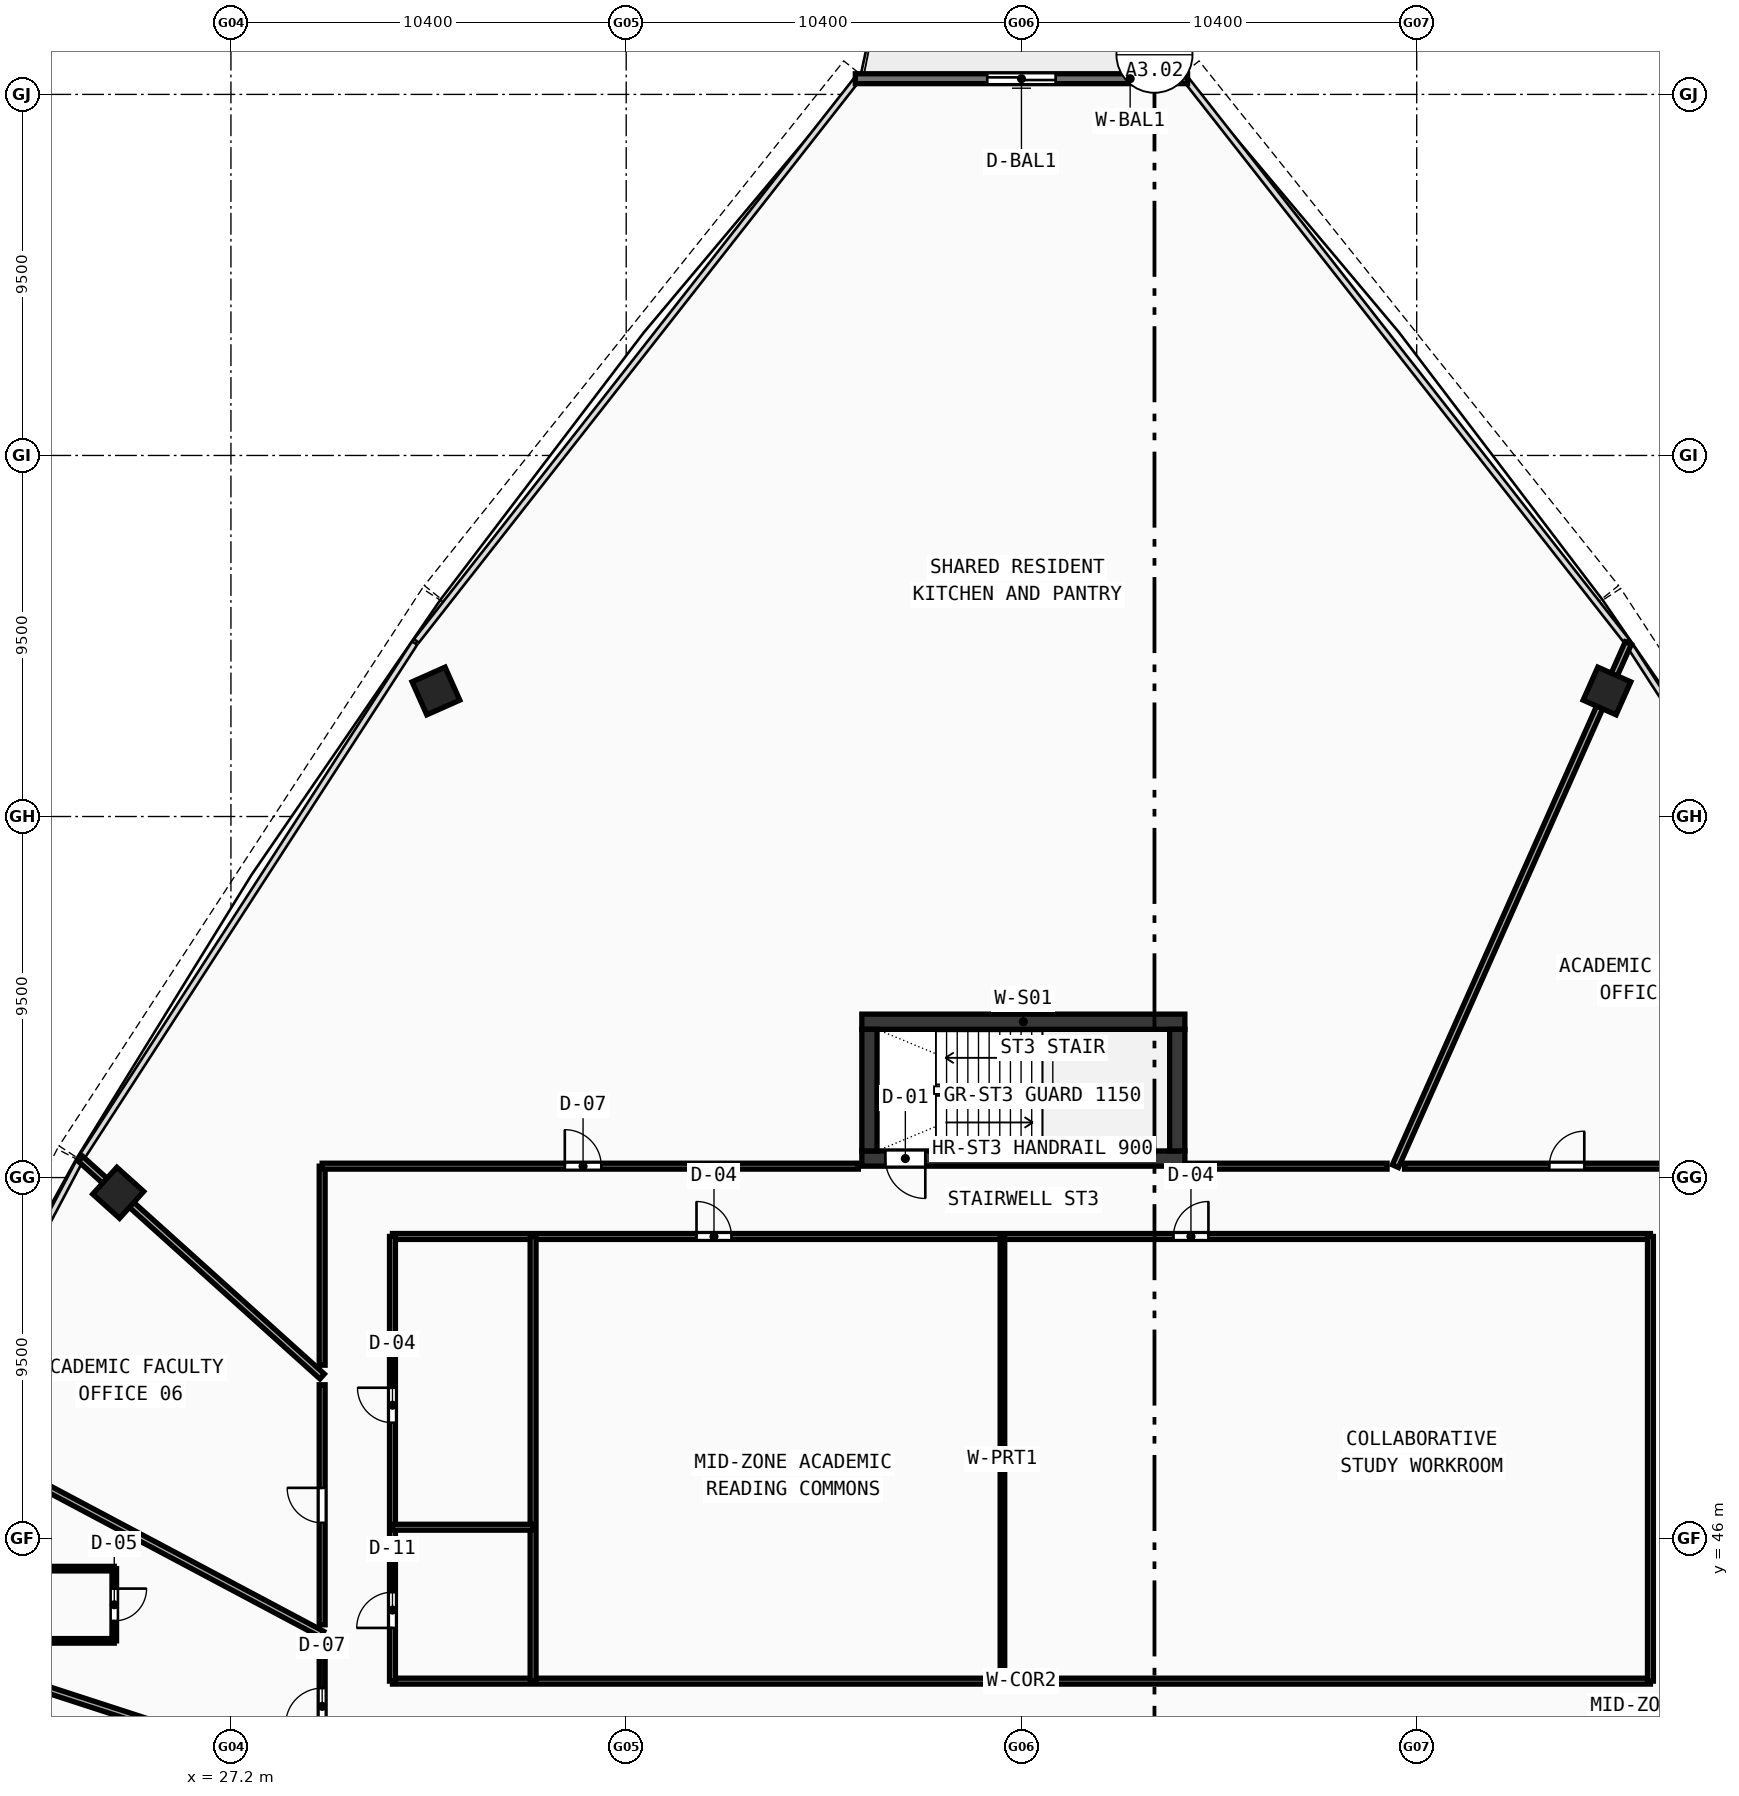
"""IFC4 building model, lengths in metres.
Left out: names, types, materials, properties, quantities, classifications, styles, units other than length and angle.
Written with IfcOpenShell. Run it as: python <this file> out.ifc"""

import sys

from ifc_helpers import new_model, si_unit, direction, frame, frame_2d, origin, origin_with_axes, origin_2d, place, context, subcontext, project, spatial, rectangle, hollow_rectangle, extrude, source, transform, mapped, element, fill, save


model = new_model("IFC4")
c1 = context("Model", 3, precision=1e-05, world=origin(), true_north=direction((0.0, 1.0)))
c2 = subcontext(c1, "Body", "Model", "MODEL_VIEW")
j1 = project(units=[si_unit("LENGTHUNIT", "METRE"), si_unit("PLANEANGLEUNIT", "RADIAN")], contexts=[c1])
p1 = place(None, origin())
s1 = spatial("IfcSite", under=j1, at=p1, CompositionType="ELEMENT")
p2 = place(p1, origin())
s2 = spatial("IfcBuilding", under=s1, at=p2, CompositionType="ELEMENT")
p3 = place(p2, frame((0.0, 0.0, 155.59)))
s3 = spatial("IfcBuildingStorey", under=s2, at=p3, CompositionType="ELEMENT", Elevation=155.59)
p4 = place(p3, frame((43.8, 59.6, 0.0), z_axis=(0.0, 0.0, 1.0), x_axis=(1.0, 0.0, 0.0)))
e1 = element("IfcWall", 1, at=p4, inside=s3, PredefinedType="SHEAR", context=c2, shape_type="SweptSolid", body=[
    extrude(rectangle(XDim=8.5, YDim=0.4, at=frame_2d((4.25, 0.0))), origin(), (0.0, 0.0, 1.0), 3.42),
])
p5 = place(p3, frame((43.8, 56.0, 0.0), z_axis=(0.0, 0.0, 1.0), x_axis=(1.0, 0.0, 0.0)))
e2 = element("IfcWall", 2, at=p5, inside=s3, PredefinedType="SHEAR", context=c2, shape_type="SweptSolid", body=[
    extrude(rectangle(XDim=8.5, YDim=0.4, at=frame_2d((4.25, 0.0))), origin(), (0.0, 0.0, 1.0), 3.42),
])
p6 = place(p5, frame((0.62, 0.0, 0.0)))
e3 = element("IfcOpeningElement", 3, at=p6, cuts=e2, PredefinedType="OPENING", context=c2, shape_type="SweptSolid", body=[
    extrude(rectangle(XDim=1.05, YDim=2.1, at=frame_2d((0.525, 1.05))), frame((0.0, 0.21, 0.0), z_axis=(0.0, -1.0, 0.0), x_axis=(1.0, 0.0, 0.0)), (0.0, 0.0, 1.0), 0.42),
])
for number, where, z_axis, x_axis in (
    (4, (44.0, 56.2, 0.0), (0.0, 0.0, 1.0), (0.0, 1.0, 0.0)),
    (5, (52.1, 56.2, 0.0), (0.0, 0.0, 1.0), (0.0, 1.0, 0.0)),
):
    element("IfcWall", number, at=place(p3, frame(where, z_axis=z_axis, x_axis=x_axis)), inside=s3, PredefinedType="SHEAR", context=c2, shape_type="SweptSolid", body=[
        extrude(rectangle(XDim=3.2, YDim=0.4, at=frame_2d((1.6, 0.0))), origin(), (0.0, 0.0, 1.0), 3.42),
    ])
m1 = source(origin(), c2, "Body", "SweptSolid", [
    extrude(hollow_rectangle(XDim=0.95, YDim=0.95, WallThickness=0.04, at=origin_2d()), origin(), (0.0, 0.0, 1.0), 3.68),
])
for number, where, z_axis, x_axis in (
    (6, (63.406, 68.303, -0.26), (0.0, 0.0, 1.0), (-0.914, 0.407, 0.0)),
    (7, (32.594, 68.303, -0.26), (0.0, 0.0, 1.0), (-0.914, -0.407, 0.0)),
    (8, (24.234, 55.099, -0.26), (0.0, 0.0, 1.0), (-0.669, -0.743, 0.0)),
):
    element("IfcColumn", number, at=place(p3, frame(where, z_axis=z_axis, x_axis=x_axis)), inside=s3, PredefinedType="COLUMN", context=c2, shape_type="MappedRepresentation", body=[
        mapped(m1, transform((0.0, 0.0, 0.0), scale=1.0)),
    ])
p7 = place(p3, frame((52.371, 84.413, 0.0), z_axis=(0.0, 0.0, 1.0), x_axis=(-1.0, 0.0, 0.0)))
e9 = element("IfcWall", 9, at=p7, inside=s3, PredefinedType="STANDARD", context=c2, shape_type="SweptSolid", body=[
    extrude(rectangle(XDim=8.742, YDim=0.26, at=frame_2d((4.371, 0.0))), origin(), (0.0, 0.0, 1.0), 3.42),
])
p8 = place(p7, frame((3.471, 0.0, 0.0)))
e10 = element("IfcOpeningElement", 10, at=p8, cuts=e9, PredefinedType="OPENING", context=c2, shape_type="SweptSolid", body=[
    extrude(rectangle(XDim=1.8, YDim=2.15, at=frame_2d((0.9, 1.075))), frame((0.0, 0.14, 0.0), z_axis=(0.0, -1.0, 0.0), x_axis=(1.0, 0.0, 0.0)), (0.0, 0.0, 1.0), 0.28),
])
p9 = place(p3, frame((31.45, 42.25, 0.0), z_axis=(0.0, 0.0, 1.0), x_axis=(1.0, 0.0, 0.0)))
e11 = element("IfcWall", 11, at=p9, inside=s3, PredefinedType="PARTITIONING", context=c2, shape_type="SweptSolid", body=[
    extrude(rectangle(XDim=33.1, YDim=0.155, at=frame_2d((16.55, 0.0))), origin(), (0.0, 0.0, 1.0), 2.77),
])
p10 = place(p3, frame((31.45, 53.95, 0.0), z_axis=(0.0, 0.0, 1.0), x_axis=(1.0, 0.0, 0.0)))
e12 = element("IfcWall", 12, at=p10, inside=s3, PredefinedType="PARTITIONING", context=c2, shape_type="SweptSolid", body=[
    extrude(rectangle(XDim=33.1, YDim=0.155, at=frame_2d((16.55, 0.0))), origin(), (0.0, 0.0, 1.0), 2.77),
])
p11 = place(p10, frame((8.0, 0.0, 0.0)))
e13 = element("IfcOpeningElement", 13, at=p11, cuts=e12, PredefinedType="OPENING", context=c2, shape_type="SweptSolid", body=[
    extrude(rectangle(XDim=0.92, YDim=2.1, at=frame_2d((0.46, 1.05))), frame((0.0, 0.087, 0.0), z_axis=(0.0, -1.0, 0.0), x_axis=(1.0, 0.0, 0.0)), (0.0, 0.0, 1.0), 0.175),
])
p12 = place(p10, frame((20.55, 0.0, 0.0)))
e14 = element("IfcOpeningElement", 14, at=p12, cuts=e12, PredefinedType="OPENING", context=c2, shape_type="SweptSolid", body=[
    extrude(rectangle(XDim=0.92, YDim=2.1, at=frame_2d((0.46, 1.05))), frame((0.0, 0.087, 0.0), z_axis=(0.0, -1.0, 0.0), x_axis=(1.0, 0.0, 0.0)), (0.0, 0.0, 1.0), 0.175),
])
p13 = place(p3, frame((31.45, 42.25, 0.0), z_axis=(0.0, 0.0, 1.0), x_axis=(0.0, 1.0, 0.0)))
e15 = element("IfcWall", 15, at=p13, inside=s3, PredefinedType="PARTITIONING", context=c2, shape_type="SweptSolid", body=[
    extrude(rectangle(XDim=11.7, YDim=0.155, at=frame_2d((5.85, 0.0))), origin(), (0.0, 0.0, 1.0), 2.77),
])
p14 = place(p13, frame((1.4, 0.0, 0.0)))
e16 = element("IfcOpeningElement", 16, at=p14, cuts=e15, PredefinedType="OPENING", context=c2, shape_type="SweptSolid", body=[
    extrude(rectangle(XDim=0.94, YDim=2.1, at=frame_2d((0.47, 1.05))), frame((0.0, 0.087, 0.0), z_axis=(0.0, -1.0, 0.0), x_axis=(1.0, 0.0, 0.0)), (0.0, 0.0, 1.0), 0.175),
])
p15 = place(p13, frame((6.8, 0.0, 0.0)))
e17 = element("IfcOpeningElement", 17, at=p15, cuts=e15, PredefinedType="OPENING", context=c2, shape_type="SweptSolid", body=[
    extrude(rectangle(XDim=0.92, YDim=2.1, at=frame_2d((0.46, 1.05))), frame((0.0, 0.087, 0.0), z_axis=(0.0, -1.0, 0.0), x_axis=(1.0, 0.0, 0.0)), (0.0, 0.0, 1.0), 0.175),
])
for number, where, z_axis, x_axis in (
    (18, (64.55, 42.25, 0.0), (0.0, 0.0, 1.0), (0.0, 1.0, 0.0)),
    (19, (35.15, 42.25, 0.0), (0.0, 0.0, 1.0), (0.0, 1.0, 0.0)),
):
    element("IfcWall", number, at=place(p3, frame(where, z_axis=z_axis, x_axis=x_axis)), inside=s3, PredefinedType="PARTITIONING", context=c2, shape_type="SweptSolid", body=[
        extrude(rectangle(XDim=11.7, YDim=0.155, at=frame_2d((5.85, 0.0))), origin(), (0.0, 0.0, 1.0), 2.77),
    ])
p16 = place(p3, frame((31.45, 46.3, 0.0), z_axis=(0.0, 0.0, 1.0), x_axis=(1.0, 0.0, 0.0)))
e20 = element("IfcWall", 20, at=p16, inside=s3, PredefinedType="PARTITIONING", context=c2, shape_type="SweptSolid", body=[
    extrude(rectangle(XDim=3.7, YDim=0.155, at=frame_2d((1.85, 0.0))), origin(), (0.0, 0.0, 1.0), 2.77),
])
p17 = place(p3, frame((47.5, 42.25, 0.0), z_axis=(0.0, 0.0, 1.0), x_axis=(0.0, 1.0, 0.0)))
e21 = element("IfcWall", 21, at=p17, inside=s3, PredefinedType="PARTITIONING", context=c2, shape_type="SweptSolid", body=[
    extrude(rectangle(XDim=11.7, YDim=0.12, at=frame_2d((5.85, 0.0))), origin(), (0.0, 0.0, 1.0), 3.02),
])
p18 = place(p3, frame((57.84, 55.8, 0.0), z_axis=(0.0, 0.0, 1.0), x_axis=(0.406736829456, 0.913545374661, 0.0)))
e22 = element("IfcWall", 22, at=p18, inside=s3, PredefinedType="PARTITIONING", context=c2, shape_type="SweptSolid", body=[
    extrude(rectangle(XDim=15.065, YDim=0.175, at=frame_2d((7.532, 0.0))), origin(), (0.0, 0.0, 1.0), 2.77),
])
p19 = place(p3, frame((29.6, 50.267, 0.0), z_axis=(0.0, 0.0, 1.0), x_axis=(-0.743147926867, 0.669127161901, 0.0)))
e23 = element("IfcWall", 23, at=p19, inside=s3, PredefinedType="PARTITIONING", context=c2, shape_type="SweptSolid", body=[
    extrude(rectangle(XDim=8.552, YDim=0.175, at=frame_2d((4.276, 0.0))), origin(), (0.0, 0.0, 1.0), 2.77),
])
p20 = place(p3, frame((29.6, 43.483, 0.0), z_axis=(0.0, 0.0, 1.0), x_axis=(-0.882944706502, 0.469476991193, 0.0)))
e24 = element("IfcWall", 24, at=p20, inside=s3, PredefinedType="PARTITIONING", context=c2, shape_type="SweptSolid", body=[
    extrude(rectangle(XDim=11.464, YDim=0.175, at=frame_2d((5.732, 0.0))), origin(), (0.0, 0.0, 1.0), 2.77),
])
p21 = place(p3, frame((29.6, 39.678, 0.0), z_axis=(0.0, 0.0, 1.0), x_axis=(-0.951059027278, 0.309009266259, 0.0)))
e25 = element("IfcWall", 25, at=p21, inside=s3, PredefinedType="PARTITIONING", context=c2, shape_type="SweptSolid", body=[
    extrude(rectangle(XDim=13.441, YDim=0.175, at=frame_2d((6.72, 0.0))), origin(), (0.0, 0.0, 1.0), 2.77),
])
p22 = place(p3, frame((29.6, 39.91, 0.0), z_axis=(0.0, 0.0, 1.0), x_axis=(0.0, 1.0, 0.0)))
e26 = element("IfcWall", 26, at=p22, inside=s3, PredefinedType="PARTITIONING", context=c2, shape_type="SweptSolid", body=[
    extrude(rectangle(XDim=3.354, YDim=0.155, at=frame_2d((1.677, 0.0))), origin(), (0.0, 0.0, 1.0), 3.02),
])
p23 = place(p22, frame((1.196, 0.0, 0.0)))
e27 = element("IfcOpeningElement", 27, at=p23, cuts=e26, PredefinedType="OPENING", context=c2, shape_type="SweptSolid", body=[
    extrude(rectangle(XDim=0.96, YDim=2.12, at=frame_2d((0.48, 1.06))), frame((0.0, 0.087, 0.0), z_axis=(0.0, -1.0, 0.0), x_axis=(1.0, 0.0, 0.0)), (0.0, 0.0, 1.0), 0.175),
])
p24 = place(p3, frame((29.6, 43.733, 0.0), z_axis=(0.0, 0.0, 1.0), x_axis=(0.0, 1.0, 0.0)))
e28 = element("IfcWall", 28, at=p24, inside=s3, PredefinedType="PARTITIONING", context=c2, shape_type="SweptSolid", body=[
    extrude(rectangle(XDim=6.315, YDim=0.155, at=frame_2d((3.157, 0.0))), origin(), (0.0, 0.0, 1.0), 2.77),
])
p25 = place(p24, frame((2.683, 0.0, 0.0)))
e29 = element("IfcOpeningElement", 29, at=p25, cuts=e28, PredefinedType="OPENING", context=c2, shape_type="SweptSolid", body=[
    extrude(rectangle(XDim=0.92, YDim=2.1, at=frame_2d((0.46, 1.05))), frame((0.0, 0.087, 0.0), z_axis=(0.0, -1.0, 0.0), x_axis=(1.0, 0.0, 0.0)), (0.0, 0.0, 1.0), 0.175),
])
p26 = place(p3, frame((29.6, 50.563, 0.0), z_axis=(0.0, 0.0, 1.0), x_axis=(0.0, 1.0, 0.0)))
e30 = element("IfcWall", 30, at=p26, inside=s3, PredefinedType="PARTITIONING", context=c2, shape_type="SweptSolid", body=[
    extrude(rectangle(XDim=5.237, YDim=0.155, at=frame_2d((2.618, 0.0))), origin(), (0.0, 0.0, 1.0), 3.02),
])
p27 = place(p3, frame((29.6, 55.8, 0.0), z_axis=(0.0, 0.0, 1.0), x_axis=(1.0, 0.0, 0.0)))
e31 = element("IfcWall", 31, at=p27, inside=s3, PredefinedType="PARTITIONING", context=c2, shape_type="SweptSolid", body=[
    extrude(rectangle(XDim=14.109, YDim=0.155, at=frame_2d((7.054, 0.0))), origin(), (0.0, 0.0, 1.0), 2.77),
])
p28 = place(p27, frame((6.385, 0.0, 0.0)))
e32 = element("IfcOpeningElement", 32, at=p28, cuts=e31, PredefinedType="OPENING", context=c2, shape_type="SweptSolid", body=[
    extrude(rectangle(XDim=0.96, YDim=2.12, at=frame_2d((0.48, 1.06))), frame((0.0, 0.087, 0.0), z_axis=(0.0, -1.0, 0.0), x_axis=(1.0, 0.0, 0.0)), (0.0, 0.0, 1.0), 0.175),
])
p29 = place(p3, frame((52.391, 55.8, 0.0), z_axis=(0.0, 0.0, 1.0), x_axis=(1.0, 0.0, 0.0)))
e33 = element("IfcWall", 33, at=p29, inside=s3, PredefinedType="PARTITIONING", context=c2, shape_type="SweptSolid", body=[
    extrude(rectangle(XDim=5.229, YDim=0.155, at=frame_2d((2.614, 0.0))), origin(), (0.0, 0.0, 1.0), 2.77),
])
p30 = place(p3, frame((58.08, 55.8, 0.0), z_axis=(0.0, 0.0, 1.0), x_axis=(1.0, 0.0, 0.0)))
e34 = element("IfcWall", 34, at=p30, inside=s3, PredefinedType="PARTITIONING", context=c2, shape_type="SweptSolid", body=[
    extrude(rectangle(XDim=8.32, YDim=0.155, at=frame_2d((4.16, 0.0))), origin(), (0.0, 0.0, 1.0), 3.02),
])
p31 = place(p30, frame((3.809, 0.0, 0.0)))
e35 = element("IfcOpeningElement", 35, at=p31, cuts=e34, PredefinedType="OPENING", context=c2, shape_type="SweptSolid", body=[
    extrude(rectangle(XDim=0.92, YDim=2.1, at=frame_2d((0.46, 1.05))), frame((0.0, 0.087, 0.0), z_axis=(0.0, -1.0, 0.0), x_axis=(1.0, 0.0, 0.0)), (0.0, 0.0, 1.0), 0.175),
])
p32 = place(p3, frame((22.08, 43.31, 0.0), z_axis=(0.0, 0.0, 1.0), x_axis=(1.0, 0.0, 0.0)))
e36 = element("IfcWall", 36, at=p32, inside=s3, PredefinedType="PARTITIONING", context=c2, shape_type="SweptSolid", body=[
    extrude(rectangle(XDim=2.05, YDim=0.12, at=frame_2d((1.025, 0.0))), origin(), (0.0, 0.0, 1.0), 3.42),
])
p33 = place(p3, frame((24.13, 43.31, 0.0), z_axis=(0.0, 0.0, 1.0), x_axis=(0.0, 1.0, 0.0)))
e37 = element("IfcWall", 37, at=p33, inside=s3, PredefinedType="PARTITIONING", context=c2, shape_type="SweptSolid", body=[
    extrude(rectangle(XDim=1.9, YDim=0.12, at=frame_2d((0.95, 0.0))), origin(), (0.0, 0.0, 1.0), 3.42),
])
p34 = place(p33, frame((0.525, 0.0, 0.0)))
e38 = element("IfcOpeningElement", 38, at=p34, cuts=e37, PredefinedType="OPENING", context=c2, shape_type="SweptSolid", body=[
    extrude(rectangle(XDim=0.85, YDim=2.1, at=frame_2d((0.425, 1.05))), frame((0.0, 0.07, 0.0), z_axis=(0.0, -1.0, 0.0), x_axis=(1.0, 0.0, 0.0)), (0.0, 0.0, 1.0), 0.14),
])
p35 = place(p3, frame((24.13, 45.21, 0.0), z_axis=(0.0, 0.0, 1.0), x_axis=(-1.0, 0.0, 0.0)))
e39 = element("IfcWall", 39, at=p35, inside=s3, PredefinedType="PARTITIONING", context=c2, shape_type="SweptSolid", body=[
    extrude(rectangle(XDim=2.05, YDim=0.12, at=frame_2d((1.025, 0.0))), origin(), (0.0, 0.0, 1.0), 3.42),
])
m2 = source(origin(), c2, "Body", "SweptSolid", [
    extrude(rectangle(XDim=1.8, YDim=2.15, at=frame_2d((0.9, 1.075))), frame((0.0, 0.025, 0.0), z_axis=(0.0, -1.0, 0.0), x_axis=(1.0, 0.0, 0.0)), (0.0, 0.0, 1.0), 0.05),
])
p36 = place(p8, origin_with_axes())
e40 = element("IfcDoor", 40, at=p36, inside=s3, OperationType="DOUBLE_DOOR_SLIDING", PredefinedType="DOOR", context=c2, shape_type="MappedRepresentation", body=[
    mapped(m2, transform((0.0, 0.0, 0.0), scale=1.0)),
])
fill(e10, e40)
m3 = source(origin(), c2, "Body", "SweptSolid", [
    extrude(rectangle(XDim=1.05, YDim=2.1, at=frame_2d((0.525, 1.05))), frame((0.0, 0.025, 0.0), z_axis=(0.0, -1.0, 0.0), x_axis=(1.0, 0.0, 0.0)), (0.0, 0.0, 1.0), 0.05),
])
p37 = place(p6, frame((1.05, 0.0, 0.0), z_axis=(0.0, 0.0, 1.0), x_axis=(-1.0, 0.0, 0.0)))
e41 = element("IfcDoor", 41, at=p37, inside=s3, OperationType="SINGLE_SWING_LEFT", PredefinedType="DOOR", context=c2, shape_type="MappedRepresentation", body=[
    mapped(m3, transform((0.0, 0.0, 0.0), scale=1.0)),
])
fill(e3, e41)
m4 = source(origin(), c2, "Body", "SweptSolid", [
    extrude(rectangle(XDim=0.94, YDim=2.1, at=frame_2d((0.47, 1.05))), frame((0.0, 0.025, 0.0), z_axis=(0.0, -1.0, 0.0), x_axis=(1.0, 0.0, 0.0)), (0.0, 0.0, 1.0), 0.05),
])
p38 = place(p14, origin_with_axes())
e42 = element("IfcDoor", 42, at=p38, inside=s3, OperationType="SINGLE_SWING_LEFT", PredefinedType="DOOR", context=c2, shape_type="MappedRepresentation", body=[
    mapped(m4, transform((0.0, 0.0, 0.0), scale=1.0)),
])
fill(e16, e42)
m5 = source(origin(), c2, "Body", "SweptSolid", [
    extrude(rectangle(XDim=0.92, YDim=2.1, at=frame_2d((0.46, 1.05))), frame((0.0, 0.025, 0.0), z_axis=(0.0, -1.0, 0.0), x_axis=(1.0, 0.0, 0.0)), (0.0, 0.0, 1.0), 0.05),
])
p39 = place(p15, origin_with_axes())
e43 = element("IfcDoor", 43, at=p39, inside=s3, OperationType="SINGLE_SWING_RIGHT", PredefinedType="DOOR", context=c2, shape_type="MappedRepresentation", body=[
    mapped(m5, transform((0.0, 0.0, 0.0), scale=1.0)),
])
fill(e17, e43)
p40 = place(p11, origin_with_axes())
e44 = element("IfcDoor", 44, at=p40, inside=s3, OperationType="SINGLE_SWING_LEFT", PredefinedType="DOOR", context=c2, shape_type="MappedRepresentation", body=[
    mapped(m5, transform((0.0, 0.0, 0.0), scale=1.0)),
])
fill(e13, e44)
p41 = place(p12, origin_with_axes())
e45 = element("IfcDoor", 45, at=p41, inside=s3, OperationType="SINGLE_SWING_RIGHT", PredefinedType="DOOR", context=c2, shape_type="MappedRepresentation", body=[
    mapped(m5, transform((0.0, 0.0, 0.0), scale=1.0)),
])
fill(e14, e45)
p42 = place(p31, origin_with_axes())
e46 = element("IfcDoor", 46, at=p42, inside=s3, OperationType="SINGLE_SWING_RIGHT", PredefinedType="DOOR", context=c2, shape_type="MappedRepresentation", body=[
    mapped(m5, transform((0.0, 0.0, 0.0), scale=1.0)),
])
fill(e35, e46)
m6 = source(origin(), c2, "Body", "SweptSolid", [
    extrude(rectangle(XDim=0.96, YDim=2.12, at=frame_2d((0.48, 1.06))), frame((0.0, 0.025, 0.0), z_axis=(0.0, -1.0, 0.0), x_axis=(1.0, 0.0, 0.0)), (0.0, 0.0, 1.0), 0.05),
])
p43 = place(p28, origin_with_axes())
e47 = element("IfcDoor", 47, at=p43, inside=s3, OperationType="SINGLE_SWING_LEFT", PredefinedType="DOOR", context=c2, shape_type="MappedRepresentation", body=[
    mapped(m6, transform((0.0, 0.0, 0.0), scale=1.0)),
])
fill(e32, e47)
p44 = place(p25, origin_with_axes())
e48 = element("IfcDoor", 48, at=p44, inside=s3, OperationType="SINGLE_SWING_RIGHT", PredefinedType="DOOR", context=c2, shape_type="MappedRepresentation", body=[
    mapped(m5, transform((0.0, 0.0, 0.0), scale=1.0)),
])
fill(e29, e48)
p45 = place(p23, origin_with_axes())
e49 = element("IfcDoor", 49, at=p45, inside=s3, OperationType="SINGLE_SWING_LEFT", PredefinedType="DOOR", context=c2, shape_type="MappedRepresentation", body=[
    mapped(m6, transform((0.0, 0.0, 0.0), scale=1.0)),
])
fill(e27, e49)
m7 = source(origin(), c2, "Body", "SweptSolid", [
    extrude(rectangle(XDim=0.85, YDim=2.1, at=frame_2d((0.425, 1.05))), frame((0.0, 0.025, 0.0), z_axis=(0.0, -1.0, 0.0), x_axis=(1.0, 0.0, 0.0)), (0.0, 0.0, 1.0), 0.05),
])
p46 = place(p34, frame((0.85, 0.0, 0.0), z_axis=(0.0, 0.0, 1.0), x_axis=(-1.0, 0.0, 0.0)))
e50 = element("IfcDoor", 50, at=p46, inside=s3, OperationType="SINGLE_SWING_LEFT", PredefinedType="DOOR", context=c2, shape_type="MappedRepresentation", body=[
    mapped(m7, transform((0.0, 0.0, 0.0), scale=1.0)),
])
fill(e38, e50)
save(model, sys.argv[1])
